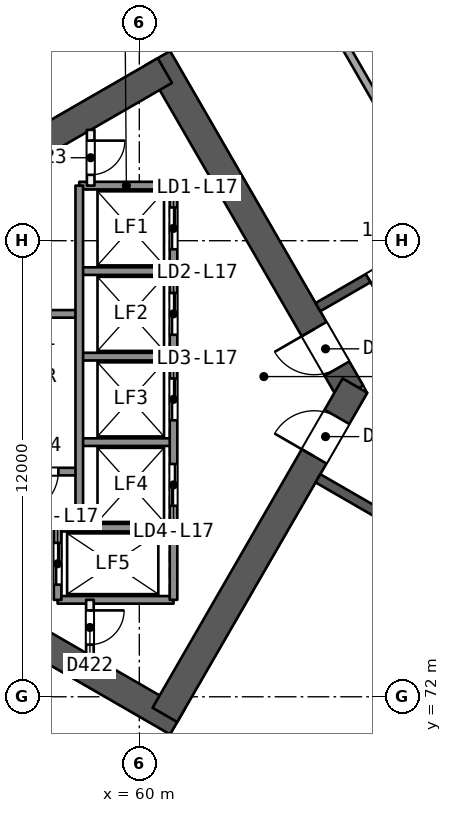
"""IFC4 building model, lengths in metres.
Left out: names, types, materials, properties, quantities, classifications, styles, units other than length and angle.
Written with IfcOpenShell. Run it as: python <this file> out.ifc"""

import sys

from ifc_helpers import new_model, si_unit, direction, frame, frame_2d, origin, place, context, subcontext, project, spatial, rectangle, extrude, element, fill, save


model = new_model("IFC4")
c1 = context("Model", 3, precision=1e-05, world=origin(), true_north=direction((0.0, 1.0)))
c2 = subcontext(c1, "Body", "Model", "MODEL_VIEW")
j1 = project(units=[si_unit("LENGTHUNIT", "METRE"), si_unit("PLANEANGLEUNIT", "RADIAN")], contexts=[c1])
p1 = place(None, origin())
s1 = spatial("IfcSite", under=j1, at=p1, CompositionType="ELEMENT")
p2 = place(p1, origin())
s2 = spatial("IfcBuilding", under=s1, at=p2, CompositionType="ELEMENT")
p3 = place(p2, frame((0.0, 0.0, 75.8)))
s3 = spatial("IfcBuildingStorey", under=s2, at=p3, CompositionType="ELEMENT", Elevation=75.8)
p4 = place(p3, frame((65.567, 80.0, 0.0), z_axis=(0.0, 0.0, 1.0), x_axis=(-0.499988615364, 0.866031976607, 0.0)))
e1 = element("IfcWall", 1, at=p4, inside=s3, PredefinedType="SHEAR", context=c2, shape_type="SweptSolid", body=[
    extrude(rectangle(XDim=10.163, YDim=0.75, at=frame_2d((5.082, 0.0))), origin(), (0.0, 0.0, 1.0), 3.7),
])
p5 = place(p4, frame((0.733, 0.0, 0.0)))
e2 = element("IfcOpeningElement", 2, at=p5, cuts=e1, PredefinedType="OPENING", context=c2, shape_type="SweptSolid", body=[
    extrude(rectangle(XDim=1.2, YDim=2.1, at=frame_2d((0.6, 1.05))), frame((0.0, 0.385, 0.0), z_axis=(0.0, -1.0, 0.0), x_axis=(1.0, 0.0, 0.0)), (0.0, 0.0, 1.0), 0.771),
])
p6 = place(p3, frame((60.673, 88.477, 0.0), z_axis=(0.0, 0.0, 1.0), x_axis=(-0.8660248072, -0.500001033313, 0.0)))
e3 = element("IfcWall", 3, at=p6, inside=s3, PredefinedType="SHEAR", context=c2, shape_type="SweptSolid", body=[
    extrude(rectangle(XDim=13.958, YDim=0.75, at=frame_2d((6.979, 0.0))), origin(), (0.0, 0.0, 1.0), 3.7),
])
p7 = place(p3, frame((48.772, 78.394, 0.0), z_axis=(0.0, 0.0, 1.0), x_axis=(0.866028339916, -0.499994914436, 0.0)))
e4 = element("IfcWall", 4, at=p7, inside=s3, PredefinedType="SHEAR", context=c2, shape_type="SweptSolid", body=[
    extrude(rectangle(XDim=14.117, YDim=0.75, at=frame_2d((7.059, 0.0))), origin(), (0.0, 0.0, 1.0), 3.7),
])
p8 = place(p3, frame((60.673, 71.523, 0.0), z_axis=(0.0, 0.0, 1.0), x_axis=(0.499997052475, 0.866027105532, 0.0)))
e5 = element("IfcWall", 5, at=p8, inside=s3, PredefinedType="SHEAR", context=c2, shape_type="SweptSolid", body=[
    extrude(rectangle(XDim=10.005, YDim=0.75, at=frame_2d((5.002, 0.0))), origin(), (0.0, 0.0, 1.0), 3.7),
])
p9 = place(p8, frame((7.855, 0.0, 0.0)))
e6 = element("IfcOpeningElement", 6, at=p9, cuts=e5, PredefinedType="OPENING", context=c2, shape_type="SweptSolid", body=[
    extrude(rectangle(XDim=1.2, YDim=2.1, at=frame_2d((0.6, 1.05))), frame((0.0, 0.385, 0.0), z_axis=(0.0, -1.0, 0.0), x_axis=(1.0, 0.0, 0.0)), (0.0, 0.0, 1.0), 0.771),
])
p10 = place(p3, frame((78.2, 90.046, 0.0), z_axis=(0.0, 0.0, 1.0), x_axis=(-0.866026492143, -0.499998114903, 0.0)))
e7 = element("IfcWall", 7, at=p10, inside=s3, PredefinedType="SHEAR", context=c2, shape_type="SweptSolid", body=[
    extrude(rectangle(XDim=15.588, YDim=0.25, at=frame_2d((7.794, 0.0))), origin(), (0.0, 0.0, 1.0), 3.2),
])
p11 = place(p10, frame((4.718, 0.0, 0.0)))
e8 = element("IfcOpeningElement", 8, at=p11, cuts=e7, PredefinedType="OPENING", context=c2, shape_type="SweptSolid", body=[
    extrude(rectangle(XDim=1.0, YDim=2.1, at=frame_2d((0.5, 1.05))), frame((0.0, 0.135, 0.0), z_axis=(0.0, -1.0, 0.0), x_axis=(1.0, 0.0, 0.0)), (0.0, 0.0, 1.0), 0.271),
])
p12 = place(p10, frame((9.785, 0.0, 0.0)))
e9 = element("IfcOpeningElement", 9, at=p12, cuts=e7, PredefinedType="OPENING", context=c2, shape_type="SweptSolid", body=[
    extrude(rectangle(XDim=1.1, YDim=2.1, at=frame_2d((0.55, 1.05))), frame((0.0, 0.135, 0.0), z_axis=(0.0, -1.0, 0.0), x_axis=(1.0, 0.0, 0.0)), (0.0, 0.0, 1.0), 0.271),
])
p13 = place(p10, frame((13.062, 0.0, 0.0)))
e10 = element("IfcOpeningElement", 10, at=p13, cuts=e7, PredefinedType="OPENING", context=c2, shape_type="SweptSolid", body=[
    extrude(rectangle(XDim=1.0, YDim=2.1, at=frame_2d((0.5, 1.05))), frame((0.0, 0.135, 0.0), z_axis=(0.0, -1.0, 0.0), x_axis=(1.0, 0.0, 0.0)), (0.0, 0.0, 1.0), 0.271),
])
p14 = place(p3, frame((64.7, 77.748, 0.0), z_axis=(0.0, 0.0, 1.0), x_axis=(0.866026492143, -0.499998114903, 0.0)))
e11 = element("IfcWall", 11, at=p14, inside=s3, PredefinedType="SHEAR", context=c2, shape_type="SweptSolid", body=[
    extrude(rectangle(XDim=15.588, YDim=0.25, at=frame_2d((7.794, 0.0))), origin(), (0.0, 0.0, 1.0), 3.2),
])
p15 = place(p14, frame((2.306, 0.0, 0.0)))
e12 = element("IfcOpeningElement", 12, at=p15, cuts=e11, PredefinedType="OPENING", context=c2, shape_type="SweptSolid", body=[
    extrude(rectangle(XDim=1.0, YDim=2.1, at=frame_2d((0.5, 1.05))), frame((0.0, 0.135, 0.0), z_axis=(0.0, -1.0, 0.0), x_axis=(1.0, 0.0, 0.0)), (0.0, 0.0, 1.0), 0.271),
])
p16 = place(p14, frame((8.003, 0.0, 0.0)))
e13 = element("IfcOpeningElement", 13, at=p16, cuts=e11, PredefinedType="OPENING", context=c2, shape_type="SweptSolid", body=[
    extrude(rectangle(XDim=1.1, YDim=2.1, at=frame_2d((0.55, 1.05))), frame((0.0, 0.135, 0.0), z_axis=(0.0, -1.0, 0.0), x_axis=(1.0, 0.0, 0.0)), (0.0, 0.0, 1.0), 0.271),
])
p17 = place(p14, frame((9.871, 0.0, 0.0)))
e14 = element("IfcOpeningElement", 14, at=p17, cuts=e11, PredefinedType="OPENING", context=c2, shape_type="SweptSolid", body=[
    extrude(rectangle(XDim=1.0, YDim=2.1, at=frame_2d((0.5, 1.05))), frame((0.0, 0.135, 0.0), z_axis=(0.0, -1.0, 0.0), x_axis=(1.0, 0.0, 0.0)), (0.0, 0.0, 1.0), 0.271),
])
for number, where, z_axis, x_axis in (
    (15, (66.137, 98.469, 0.0), (0.0, 0.0, 1.0), (0.5, -0.866, 0.0)),
    (16, (61.547, 95.819, 0.0), (0.0, 0.0, 1.0), (0.5, -0.866, 0.0)),
):
    element("IfcWall", number, at=place(p3, frame(where, z_axis=z_axis, x_axis=x_axis)), inside=s3, PredefinedType="PARTITIONING", context=c2, shape_type="SweptSolid", body=[
        extrude(rectangle(XDim=13.326, YDim=0.2, at=frame_2d((6.663, 0.0))), origin(), (0.0, 0.0, 1.0), 3.2),
    ])
p18 = place(p3, frame((62.897, 63.401, 0.0), z_axis=(0.0, 0.0, 1.0), x_axis=(0.500016752221, 0.866015731669, 0.0)))
e17 = element("IfcWall", 17, at=p18, inside=s3, PredefinedType="PARTITIONING", context=c2, shape_type="SweptSolid", body=[
    extrude(rectangle(XDim=9.263, YDim=0.2, at=frame_2d((4.632, 0.0))), origin(), (0.0, 0.0, 1.0), 3.2),
])
p19 = place(p3, frame((66.137, 61.531, 0.0), z_axis=(0.0, 0.0, 1.0), x_axis=(0.500006843521, 0.86602145264, 0.0)))
e18 = element("IfcWall", 18, at=p19, inside=s3, PredefinedType="PARTITIONING", context=c2, shape_type="SweptSolid", body=[
    extrude(rectangle(XDim=13.326, YDim=0.2, at=frame_2d((6.663, 0.0))), origin(), (0.0, 0.0, 1.0), 3.2),
])
p20 = place(p3, frame((39.093, 83.027, 0.0), z_axis=(0.0, 0.0, 1.0), x_axis=(0.866024586246, 0.500001416016, 0.0)))
e19 = element("IfcWall", 19, at=p20, inside=s3, PredefinedType="SOLIDWALL", context=c2, shape_type="SweptSolid", body=[
    extrude(rectangle(XDim=59.166, YDim=0.3, at=frame_2d((29.583, 0.0))), origin(), (0.0, 0.0, 1.0), 3.2),
])
p21 = place(p20, frame((27.292, 0.0, 0.0)))
e20 = element("IfcOpeningElement", 20, at=p21, cuts=e19, PredefinedType="OPENING", context=c2, shape_type="SweptSolid", body=[
    extrude(rectangle(XDim=2.4, YDim=2.4, at=frame_2d((1.2, 1.2))), frame((0.0, 0.161, 0.0), z_axis=(0.0, -1.0, 0.0), x_axis=(1.0, 0.0, 0.0)), (0.0, 0.0, 1.0), 0.321),
])
p22 = place(p20, frame((22.615, 0.0, 0.0)))
e21 = element("IfcOpeningElement", 21, at=p22, cuts=e19, PredefinedType="OPENING", context=c2, shape_type="SweptSolid", body=[
    extrude(rectangle(XDim=2.4, YDim=2.4, at=frame_2d((1.2, 1.2))), frame((0.0, 0.161, 0.0), z_axis=(0.0, -1.0, 0.0), x_axis=(1.0, 0.0, 0.0)), (0.0, 0.0, 1.0), 0.321),
])
p23 = place(p20, frame((10.88, 0.0, 0.0)))
e22 = element("IfcOpeningElement", 22, at=p23, cuts=e19, PredefinedType="OPENING", context=c2, shape_type="SweptSolid", body=[
    extrude(rectangle(XDim=2.4, YDim=2.4, at=frame_2d((1.2, 1.2))), frame((0.0, 0.161, 0.0), z_axis=(0.0, -1.0, 0.0), x_axis=(1.0, 0.0, 0.0)), (0.0, 0.0, 1.0), 0.321),
])
p24 = place(p20, frame((43.998, 0.0, 0.0)))
e23 = element("IfcOpeningElement", 23, at=p24, cuts=e19, PredefinedType="OPENING", context=c2, shape_type="SweptSolid", body=[
    extrude(rectangle(XDim=2.4, YDim=2.4, at=frame_2d((1.2, 1.2))), frame((0.0, 0.161, 0.0), z_axis=(0.0, -1.0, 0.0), x_axis=(1.0, 0.0, 0.0)), (0.0, 0.0, 1.0), 0.321),
])
p25 = place(p3, frame((90.332, 47.39, 0.0), z_axis=(0.0, 0.0, 1.0), x_axis=(-0.866024586246, 0.500001416016, 0.0)))
e24 = element("IfcWall", 24, at=p25, inside=s3, PredefinedType="SOLIDWALL", context=c2, shape_type="SweptSolid", body=[
    extrude(rectangle(XDim=59.166, YDim=0.3, at=frame_2d((29.583, 0.0))), origin(), (0.0, 0.0, 1.0), 3.2),
])
p26 = place(p25, frame((28.695, 0.0, 0.0)))
e25 = element("IfcOpeningElement", 25, at=p26, cuts=e24, PredefinedType="OPENING", context=c2, shape_type="SweptSolid", body=[
    extrude(rectangle(XDim=2.4, YDim=2.4, at=frame_2d((1.2, 1.2))), frame((0.0, 0.161, 0.0), z_axis=(0.0, -1.0, 0.0), x_axis=(1.0, 0.0, 0.0)), (0.0, 0.0, 1.0), 0.321),
])
p27 = place(p25, frame((33.372, 0.0, 0.0)))
e26 = element("IfcOpeningElement", 26, at=p27, cuts=e24, PredefinedType="OPENING", context=c2, shape_type="SweptSolid", body=[
    extrude(rectangle(XDim=2.4, YDim=2.4, at=frame_2d((1.2, 1.2))), frame((0.0, 0.161, 0.0), z_axis=(0.0, -1.0, 0.0), x_axis=(1.0, 0.0, 0.0)), (0.0, 0.0, 1.0), 0.321),
])
p28 = place(p25, frame((45.903, 0.0, 0.0)))
e27 = element("IfcOpeningElement", 27, at=p28, cuts=e24, PredefinedType="OPENING", context=c2, shape_type="SweptSolid", body=[
    extrude(rectangle(XDim=2.4, YDim=2.4, at=frame_2d((1.2, 1.2))), frame((0.0, 0.161, 0.0), z_axis=(0.0, -1.0, 0.0), x_axis=(1.0, 0.0, 0.0)), (0.0, 0.0, 1.0), 0.321),
])
p29 = place(p25, frame((12.769, 0.0, 0.0)))
e28 = element("IfcOpeningElement", 28, at=p29, cuts=e24, PredefinedType="OPENING", context=c2, shape_type="SweptSolid", body=[
    extrude(rectangle(XDim=2.4, YDim=2.4, at=frame_2d((1.2, 1.2))), frame((0.0, 0.161, 0.0), z_axis=(0.0, -1.0, 0.0), x_axis=(1.0, 0.0, 0.0)), (0.0, 0.0, 1.0), 0.321),
])
for number, where, z_axis, x_axis in (
    (29, (60.9, 85.45, 0.0), (0.0, 0.0, 1.0), (-1.0, 0.0, 0.0)),
    (30, (60.9, 83.2, 0.0), (0.0, 0.0, 1.0), (-1.0, 0.0, 0.0)),
):
    element("IfcWall", number, at=place(p3, frame(where, z_axis=z_axis, x_axis=x_axis)), inside=s3, PredefinedType="SOLIDWALL", context=c2, shape_type="SweptSolid", body=[
        extrude(rectangle(XDim=2.48, YDim=0.2, at=frame_2d((1.24, 0.0))), origin(), (0.0, 0.0, 1.0), 3.2),
    ])
p30 = place(p3, frame((58.42, 82.075, 0.0), z_axis=(0.0, 0.0, 1.0), x_axis=(-1.0, 0.0, 0.0)))
e31 = element("IfcWall", 31, at=p30, inside=s3, PredefinedType="SOLIDWALL", context=c2, shape_type="SweptSolid", body=[
    extrude(rectangle(XDim=7.7, YDim=0.2, at=frame_2d((3.85, 0.0))), origin(), (0.0, 0.0, 1.0), 3.2),
])
for number, where, z_axis, x_axis in (
    (32, (60.9, 80.95, 0.0), (0.0, 0.0, 1.0), (-1.0, 0.0, 0.0)),
    (33, (60.9, 78.7, 0.0), (0.0, 0.0, 1.0), (-1.0, 0.0, 0.0)),
):
    element("IfcWall", number, at=place(p3, frame(where, z_axis=z_axis, x_axis=x_axis)), inside=s3, PredefinedType="SOLIDWALL", context=c2, shape_type="SweptSolid", body=[
        extrude(rectangle(XDim=2.48, YDim=0.2, at=frame_2d((1.24, 0.0))), origin(), (0.0, 0.0, 1.0), 3.2),
    ])
p31 = place(p3, frame((58.42, 77.925, 0.0), z_axis=(0.0, 0.0, 1.0), x_axis=(-1.0, 0.0, 0.0)))
e34 = element("IfcWall", 34, at=p31, inside=s3, PredefinedType="SOLIDWALL", context=c2, shape_type="SweptSolid", body=[
    extrude(rectangle(XDim=7.7, YDim=0.2, at=frame_2d((3.85, 0.0))), origin(), (0.0, 0.0, 1.0), 3.2),
])
p32 = place(p31, frame((0.55, 0.0, 0.0)))
e35 = element("IfcOpeningElement", 35, at=p32, cuts=e34, PredefinedType="OPENING", context=c2, shape_type="SweptSolid", body=[
    extrude(rectangle(XDim=1.1, YDim=2.1, at=frame_2d((0.55, 1.05))), frame((0.0, 0.11, 0.0), z_axis=(0.0, -1.0, 0.0), x_axis=(1.0, 0.0, 0.0)), (0.0, 0.0, 1.0), 0.221),
])
for number, where, z_axis, x_axis in (
    (36, (60.9, 76.45, 0.0), (0.0, 0.0, 1.0), (-1.0, 0.0, 0.0)),
    (37, (60.9, 74.55, 0.0), (0.0, 0.0, 1.0), (-1.0, 0.0, 0.0)),
):
    element("IfcWall", number, at=place(p3, frame(where, z_axis=z_axis, x_axis=x_axis)), inside=s3, PredefinedType="SOLIDWALL", context=c2, shape_type="SweptSolid", body=[
        extrude(rectangle(XDim=3.05, YDim=0.2, at=frame_2d((1.525, 0.0))), origin(), (0.0, 0.0, 1.0), 3.2),
    ])
p33 = place(p3, frame((60.9, 85.45, 0.0), z_axis=(0.0, 0.0, 1.0), x_axis=(0.0, -1.0, 0.0)))
e38 = element("IfcWall", 38, at=p33, inside=s3, PredefinedType="SOLIDWALL", context=c2, shape_type="SweptSolid", body=[
    extrude(rectangle(XDim=10.9, YDim=0.2, at=frame_2d((5.45, 0.0))), origin(), (0.0, 0.0, 1.0), 3.2),
])
p34 = place(p33, frame((0.575, 0.0, 0.0)))
e39 = element("IfcOpeningElement", 39, at=p34, cuts=e38, PredefinedType="OPENING", context=c2, shape_type="SweptSolid", body=[
    extrude(rectangle(XDim=1.1, YDim=2.1, at=frame_2d((0.55, 1.05))), frame((0.0, 0.11, 0.0), z_axis=(0.0, -1.0, 0.0), x_axis=(1.0, 0.0, 0.0)), (0.0, 0.0, 1.0), 0.221),
])
p35 = place(p33, frame((2.825, 0.0, 0.0)))
e40 = element("IfcOpeningElement", 40, at=p35, cuts=e38, PredefinedType="OPENING", context=c2, shape_type="SweptSolid", body=[
    extrude(rectangle(XDim=1.1, YDim=2.1, at=frame_2d((0.55, 1.05))), frame((0.0, 0.11, 0.0), z_axis=(0.0, -1.0, 0.0), x_axis=(1.0, 0.0, 0.0)), (0.0, 0.0, 1.0), 0.221),
])
p36 = place(p33, frame((5.075, 0.0, 0.0)))
e41 = element("IfcOpeningElement", 41, at=p36, cuts=e38, PredefinedType="OPENING", context=c2, shape_type="SweptSolid", body=[
    extrude(rectangle(XDim=1.1, YDim=2.1, at=frame_2d((0.55, 1.05))), frame((0.0, 0.11, 0.0), z_axis=(0.0, -1.0, 0.0), x_axis=(1.0, 0.0, 0.0)), (0.0, 0.0, 1.0), 0.221),
])
p37 = place(p33, frame((7.325, 0.0, 0.0)))
e42 = element("IfcOpeningElement", 42, at=p37, cuts=e38, PredefinedType="OPENING", context=c2, shape_type="SweptSolid", body=[
    extrude(rectangle(XDim=1.1, YDim=2.1, at=frame_2d((0.55, 1.05))), frame((0.0, 0.11, 0.0), z_axis=(0.0, -1.0, 0.0), x_axis=(1.0, 0.0, 0.0)), (0.0, 0.0, 1.0), 0.221),
])
p38 = place(p3, frame((58.72, 86.917, 0.0), z_axis=(0.0, 0.0, 1.0), x_axis=(0.0, -1.0, 0.0)))
e43 = element("IfcWall", 43, at=p38, inside=s3, PredefinedType="PARTITIONING", context=c2, shape_type="SweptSolid", body=[
    extrude(rectangle(XDim=1.467, YDim=0.2, at=frame_2d((0.733, 0.0))), origin(), (0.0, 0.0, 1.0), 3.2),
])
p39 = place(p38, frame((0.283, 0.0, 0.0)))
e44 = element("IfcOpeningElement", 44, at=p39, cuts=e43, PredefinedType="OPENING", context=c2, shape_type="SweptSolid", body=[
    extrude(rectangle(XDim=0.9, YDim=2.1, at=frame_2d((0.45, 1.05))), frame((0.0, 0.11, 0.0), z_axis=(0.0, -1.0, 0.0), x_axis=(1.0, 0.0, 0.0)), (0.0, 0.0, 1.0), 0.221),
])
p40 = place(p3, frame((58.7, 74.55, 0.0), z_axis=(0.0, 0.0, 1.0), x_axis=(0.0, -1.0, 0.0)))
e45 = element("IfcWall", 45, at=p40, inside=s3, PredefinedType="PARTITIONING", context=c2, shape_type="SweptSolid", body=[
    extrude(rectangle(XDim=1.455, YDim=0.2, at=frame_2d((0.728, 0.0))), origin(), (0.0, 0.0, 1.0), 3.2),
])
p41 = place(p40, frame((0.278, 0.0, 0.0)))
e46 = element("IfcOpeningElement", 46, at=p41, cuts=e45, PredefinedType="OPENING", context=c2, shape_type="SweptSolid", body=[
    extrude(rectangle(XDim=0.9, YDim=2.1, at=frame_2d((0.45, 1.05))), frame((0.0, 0.11, 0.0), z_axis=(0.0, -1.0, 0.0), x_axis=(1.0, 0.0, 0.0)), (0.0, 0.0, 1.0), 0.221),
])
p42 = place(p3, frame((58.42, 85.45, 0.0), z_axis=(0.0, 0.0, 1.0), x_axis=(0.0, -1.0, 0.0)))
e47 = element("IfcWall", 47, at=p42, inside=s3, PredefinedType="SOLIDWALL", context=c2, shape_type="SweptSolid", body=[
    extrude(rectangle(XDim=9.0, YDim=0.2, at=frame_2d((4.5, 0.0))), origin(), (0.0, 0.0, 1.0), 3.2),
])
p43 = place(p3, frame((57.85, 76.45, 0.0), z_axis=(0.0, 0.0, 1.0), x_axis=(0.0, -1.0, 0.0)))
e48 = element("IfcWall", 48, at=p43, inside=s3, PredefinedType="SOLIDWALL", context=c2, shape_type="SweptSolid", body=[
    extrude(rectangle(XDim=1.9, YDim=0.2, at=frame_2d((0.95, 0.0))), origin(), (0.0, 0.0, 1.0), 3.2),
])
p44 = place(p43, frame((0.4, 0.0, 0.0)))
e49 = element("IfcOpeningElement", 49, at=p44, cuts=e48, PredefinedType="OPENING", context=c2, shape_type="SweptSolid", body=[
    extrude(rectangle(XDim=1.1, YDim=2.1, at=frame_2d((0.55, 1.05))), frame((0.0, 0.11, 0.0), z_axis=(0.0, -1.0, 0.0), x_axis=(1.0, 0.0, 0.0)), (0.0, 0.0, 1.0), 0.221),
])
p45 = place(p13, origin())
e50 = element("IfcDoor", 50, at=p45, inside=s3, OperationType="SINGLE_SWING_RIGHT", PredefinedType="NOTDEFINED", context=c2, shape_type="SweptSolid", body=[
    extrude(rectangle(XDim=1.0, YDim=2.1, at=frame_2d((0.5, 1.05))), frame((0.0, 0.025, 0.0), z_axis=(0.0, -1.0, 0.0), x_axis=(1.0, 0.0, 0.0)), (0.0, 0.0, 1.0), 0.05),
])
fill(e10, e50)
p46 = place(p5, origin())
e51 = element("IfcDoor", 51, at=p46, inside=s3, OperationType="SINGLE_SWING_RIGHT", PredefinedType="NOTDEFINED", context=c2, shape_type="SweptSolid", body=[
    extrude(rectangle(XDim=1.2, YDim=2.1, at=frame_2d((0.6, 1.05))), frame((0.0, 0.025, 0.0), z_axis=(0.0, -1.0, 0.0), x_axis=(1.0, 0.0, 0.0)), (0.0, 0.0, 1.0), 0.05),
])
fill(e2, e51)
p47 = place(p9, origin())
e52 = element("IfcDoor", 52, at=p47, inside=s3, OperationType="SINGLE_SWING_LEFT", PredefinedType="NOTDEFINED", context=c2, shape_type="SweptSolid", body=[
    extrude(rectangle(XDim=1.2, YDim=2.1, at=frame_2d((0.6, 1.05))), frame((0.0, 0.025, 0.0), z_axis=(0.0, -1.0, 0.0), x_axis=(1.0, 0.0, 0.0)), (0.0, 0.0, 1.0), 0.05),
])
fill(e6, e52)
p48 = place(p34, origin())
e53 = element("IfcDoor", 53, at=p48, inside=s3, OperationType="SLIDING_TO_RIGHT", PredefinedType="NOTDEFINED", context=c2, shape_type="SweptSolid", body=[
    extrude(rectangle(XDim=1.1, YDim=2.1, at=frame_2d((0.55, 1.05))), frame((0.0, 0.025, 0.0), z_axis=(0.0, -1.0, 0.0), x_axis=(1.0, 0.0, 0.0)), (0.0, 0.0, 1.0), 0.05),
])
fill(e39, e53)
p49 = place(p35, origin())
e54 = element("IfcDoor", 54, at=p49, inside=s3, OperationType="SLIDING_TO_LEFT", PredefinedType="NOTDEFINED", context=c2, shape_type="SweptSolid", body=[
    extrude(rectangle(XDim=1.1, YDim=2.1, at=frame_2d((0.55, 1.05))), frame((0.0, 0.025, 0.0), z_axis=(0.0, -1.0, 0.0), x_axis=(1.0, 0.0, 0.0)), (0.0, 0.0, 1.0), 0.05),
])
fill(e40, e54)
p50 = place(p36, origin())
e55 = element("IfcDoor", 55, at=p50, inside=s3, OperationType="SLIDING_TO_RIGHT", PredefinedType="NOTDEFINED", context=c2, shape_type="SweptSolid", body=[
    extrude(rectangle(XDim=1.1, YDim=2.1, at=frame_2d((0.55, 1.05))), frame((0.0, 0.025, 0.0), z_axis=(0.0, -1.0, 0.0), x_axis=(1.0, 0.0, 0.0)), (0.0, 0.0, 1.0), 0.05),
])
fill(e41, e55)
p51 = place(p37, origin())
e56 = element("IfcDoor", 56, at=p51, inside=s3, OperationType="SLIDING_TO_LEFT", PredefinedType="NOTDEFINED", context=c2, shape_type="SweptSolid", body=[
    extrude(rectangle(XDim=1.1, YDim=2.1, at=frame_2d((0.55, 1.05))), frame((0.0, 0.025, 0.0), z_axis=(0.0, -1.0, 0.0), x_axis=(1.0, 0.0, 0.0)), (0.0, 0.0, 1.0), 0.05),
])
fill(e42, e56)
p52 = place(p44, origin())
e57 = element("IfcDoor", 57, at=p52, inside=s3, OperationType="SLIDING_TO_RIGHT", PredefinedType="NOTDEFINED", context=c2, shape_type="SweptSolid", body=[
    extrude(rectangle(XDim=1.1, YDim=2.1, at=frame_2d((0.55, 1.05))), frame((0.0, 0.025, 0.0), z_axis=(0.0, -1.0, 0.0), x_axis=(1.0, 0.0, 0.0)), (0.0, 0.0, 1.0), 0.05),
])
fill(e49, e57)
p53 = place(p41, origin())
e58 = element("IfcDoor", 58, at=p53, inside=s3, OperationType="SINGLE_SWING_LEFT", PredefinedType="NOTDEFINED", context=c2, shape_type="SweptSolid", body=[
    extrude(rectangle(XDim=0.9, YDim=2.1, at=frame_2d((0.45, 1.05))), frame((0.0, 0.025, 0.0), z_axis=(0.0, -1.0, 0.0), x_axis=(1.0, 0.0, 0.0)), (0.0, 0.0, 1.0), 0.05),
])
fill(e46, e58)
p54 = place(p39, origin())
e59 = element("IfcDoor", 59, at=p54, inside=s3, OperationType="SINGLE_SWING_LEFT", PredefinedType="NOTDEFINED", context=c2, shape_type="SweptSolid", body=[
    extrude(rectangle(XDim=0.9, YDim=2.1, at=frame_2d((0.45, 1.05))), frame((0.0, 0.025, 0.0), z_axis=(0.0, -1.0, 0.0), x_axis=(1.0, 0.0, 0.0)), (0.0, 0.0, 1.0), 0.05),
])
fill(e44, e59)
p55 = place(p32, origin())
e60 = element("IfcDoor", 60, at=p55, inside=s3, OperationType="SINGLE_SWING_RIGHT", PredefinedType="NOTDEFINED", context=c2, shape_type="SweptSolid", body=[
    extrude(rectangle(XDim=1.1, YDim=2.1, at=frame_2d((0.55, 1.05))), frame((0.0, 0.025, 0.0), z_axis=(0.0, -1.0, 0.0), x_axis=(1.0, 0.0, 0.0)), (0.0, 0.0, 1.0), 0.05),
])
fill(e35, e60)
save(model, sys.argv[1])
